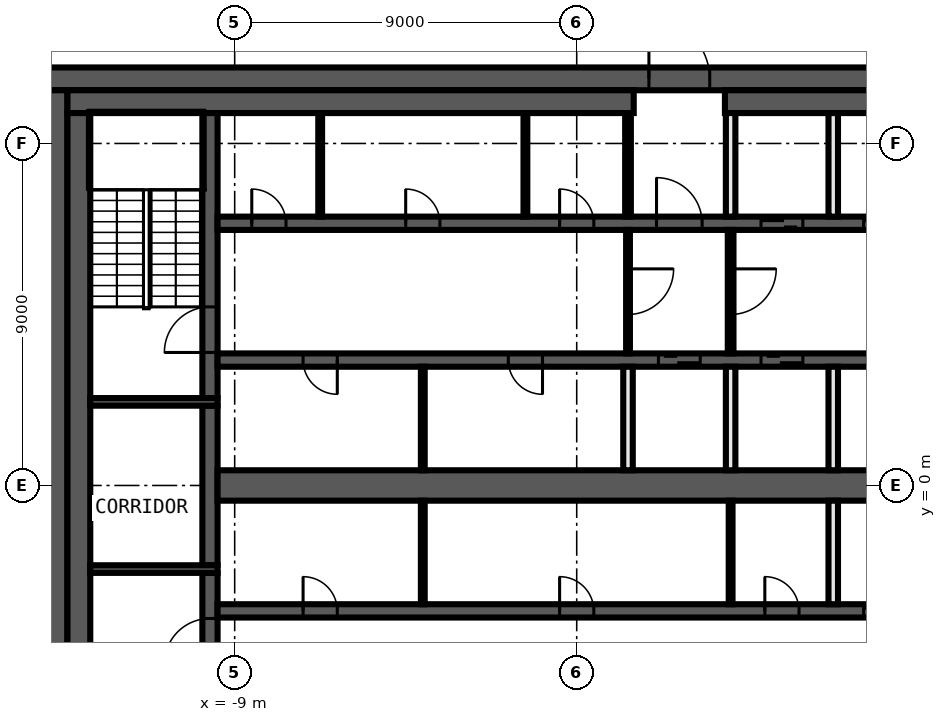
"""IFC4 building model, lengths in metres.
Left out: names, types, materials, properties, quantities, classifications, styles, units other than length and angle.
Written with IfcOpenShell. Run it as: python <this file> out.ifc"""

import sys

from ifc_helpers import new_model, si_unit, direction, frame, frame_2d, origin, place, context, subcontext, project, spatial, rectangle, extrude, element, fill, save


model = new_model("IFC4")
c1 = context("Model", 3, precision=1e-05, world=origin(), true_north=direction((0.0, 1.0)))
c2 = subcontext(c1, "Body", "Model", "MODEL_VIEW")
j1 = project(units=[si_unit("LENGTHUNIT", "METRE"), si_unit("PLANEANGLEUNIT", "RADIAN")], contexts=[c1])
p1 = place(None, origin())
s1 = spatial("IfcSite", under=j1, at=p1, CompositionType="ELEMENT")
p2 = place(p1, origin())
s2 = spatial("IfcBuilding", under=s1, at=p2, CompositionType="ELEMENT")
p3 = place(p2, frame((0.0, 0.0, 344.6)))
s3 = spatial("IfcBuildingStorey", under=s2, at=p3, CompositionType="ELEMENT", Elevation=344.6)
p4 = place(p3, frame((-14.0, 10.7, 0.0), z_axis=(0.0, 0.0, 1.0), x_axis=(1.0, 0.0, 0.0)))
e1 = element("IfcWall", 1, at=p4, inside=s3, PredefinedType="SHEAR", context=c2, shape_type="SweptSolid", body=[
    extrude(rectangle(XDim=28.0, YDim=0.6, at=frame_2d((14.0, 0.0))), origin(), (0.0, 0.0, 1.0), 3.82),
])
p5 = place(p4, frame((15.9, 0.0, 0.0)))
e2 = element("IfcOpeningElement", 2, at=p5, cuts=e1, PredefinedType="OPENING", context=c2, shape_type="SweptSolid", body=[
    extrude(rectangle(XDim=1.6, YDim=2.1, at=frame_2d((0.8, 1.05))), frame((0.0, 0.31, 0.0), z_axis=(0.0, -1.0, 0.0), x_axis=(1.0, 0.0, 0.0)), (0.0, 0.0, 1.0), 0.62),
])
p6 = place(p3, frame((-13.7, -10.4, 0.0), z_axis=(0.0, 0.0, 1.0), x_axis=(0.0, 1.0, 0.0)))
e3 = element("IfcWall", 3, at=p6, inside=s3, PredefinedType="SHEAR", context=c2, shape_type="SweptSolid", body=[
    extrude(rectangle(XDim=20.8, YDim=0.6, at=frame_2d((10.4, 0.0))), origin(), (0.0, 0.0, 1.0), 3.82),
])
p7 = place(p3, frame((-13.4, 10.1, 0.0), z_axis=(0.0, 0.0, 1.0), x_axis=(1.0, 0.0, 0.0)))
e4 = element("IfcWall", 4, at=p7, inside=s3, PredefinedType="SHEAR", context=c2, shape_type="SweptSolid", body=[
    extrude(rectangle(XDim=14.9, YDim=0.6, at=frame_2d((7.45, 0.0))), origin(), (0.0, 0.0, 1.0), 3.82),
])
p8 = place(p3, frame((3.9, 10.1, 0.0), z_axis=(0.0, 0.0, 1.0), x_axis=(1.0, 0.0, 0.0)))
e5 = element("IfcWall", 5, at=p8, inside=s3, PredefinedType="SHEAR", context=c2, shape_type="SweptSolid", body=[
    extrude(rectangle(XDim=9.5, YDim=0.6, at=frame_2d((4.75, 0.0))), origin(), (0.0, 0.0, 1.0), 3.82),
])
p9 = place(p3, frame((-13.1, -9.8, 0.0), z_axis=(0.0, 0.0, 1.0), x_axis=(0.0, 1.0, 0.0)))
e6 = element("IfcWall", 6, at=p9, inside=s3, PredefinedType="SHEAR", context=c2, shape_type="SweptSolid", body=[
    extrude(rectangle(XDim=19.6, YDim=0.6, at=frame_2d((9.8, 0.0))), origin(), (0.0, 0.0, 1.0), 3.82),
])
p10 = place(p3, frame((-9.65, -9.8, 0.0), z_axis=(0.0, 0.0, 1.0), x_axis=(0.0, 1.0, 0.0)))
e7 = element("IfcWall", 7, at=p10, inside=s3, PredefinedType="SHEAR", context=c2, shape_type="SweptSolid", body=[
    extrude(rectangle(XDim=7.5, YDim=0.4, at=frame_2d((3.75, 0.0))), origin(), (0.0, 0.0, 1.0), 3.82),
])
p11 = place(p10, frame((5.1, 0.0, 0.0)))
e8 = element("IfcOpeningElement", 8, at=p11, cuts=e7, PredefinedType="OPENING", context=c2, shape_type="SweptSolid", body=[
    extrude(rectangle(XDim=1.2, YDim=2.1, at=frame_2d((0.6, 1.05))), frame((0.0, 0.21, 0.0), z_axis=(0.0, -1.0, 0.0), x_axis=(1.0, 0.0, 0.0)), (0.0, 0.0, 1.0), 0.42),
])
p12 = place(p3, frame((-9.65, -2.1, 0.0), z_axis=(0.0, 0.0, 1.0), x_axis=(0.0, 1.0, 0.0)))
e9 = element("IfcWall", 9, at=p12, inside=s3, PredefinedType="SHEAR", context=c2, shape_type="SweptSolid", body=[
    extrude(rectangle(XDim=4.2, YDim=0.4, at=frame_2d((2.1, 0.0))), origin(), (0.0, 0.0, 1.0), 3.82),
])
p13 = place(p3, frame((-9.65, 2.3, 0.0), z_axis=(0.0, 0.0, 1.0), x_axis=(0.0, 1.0, 0.0)))
e10 = element("IfcWall", 10, at=p13, inside=s3, PredefinedType="SHEAR", context=c2, shape_type="SweptSolid", body=[
    extrude(rectangle(XDim=7.5, YDim=0.4, at=frame_2d((3.75, 0.0))), origin(), (0.0, 0.0, 1.0), 3.82),
])
p14 = place(p13, frame((1.2, 0.0, 0.0)))
e11 = element("IfcOpeningElement", 11, at=p14, cuts=e10, PredefinedType="OPENING", context=c2, shape_type="SweptSolid", body=[
    extrude(rectangle(XDim=1.2, YDim=2.1, at=frame_2d((0.6, 1.05))), frame((0.0, 0.21, 0.0), z_axis=(0.0, -1.0, 0.0), x_axis=(1.0, 0.0, 0.0)), (0.0, 0.0, 1.0), 0.42),
])
for number, where, z_axis, x_axis in (
    (12, (-9.45, 2.2, 0.0), (0.0, 0.0, 1.0), (-1.0, 0.0, 0.0)),
    (13, (-9.45, -2.2, 0.0), (0.0, 0.0, 1.0), (-1.0, 0.0, 0.0)),
):
    element("IfcWall", number, at=place(p3, frame(where, z_axis=z_axis, x_axis=x_axis)), inside=s3, PredefinedType="SHEAR", context=c2, shape_type="SweptSolid", body=[
        extrude(rectangle(XDim=3.35, YDim=0.2, at=frame_2d((1.675, 0.0))), origin(), (0.0, 0.0, 1.0), 3.82),
    ])
p15 = place(p3, frame((-9.45, 6.9, 0.0), z_axis=(0.0, 0.0, 1.0), x_axis=(1.0, 0.0, 0.0)))
e14 = element("IfcWall", 14, at=p15, inside=s3, PredefinedType="SHEAR", context=c2, shape_type="SweptSolid", body=[
    extrude(rectangle(XDim=18.9, YDim=0.35, at=frame_2d((9.45, 0.0))), origin(), (0.0, 0.0, 1.0), 3.82),
])
p16 = place(p15, frame((11.55, 0.0, 0.0)))
e15 = element("IfcOpeningElement", 15, at=p16, cuts=e14, PredefinedType="OPENING", context=c2, shape_type="SweptSolid", body=[
    extrude(rectangle(XDim=1.2, YDim=2.1, at=frame_2d((0.6, 1.05))), frame((0.0, 0.185, 0.0), z_axis=(0.0, -1.0, 0.0), x_axis=(1.0, 0.0, 0.0)), (0.0, 0.0, 1.0), 0.37),
])
p17 = place(p15, frame((14.3, 0.0, 0.0)))
e16 = element("IfcOpeningElement", 16, at=p17, cuts=e14, PredefinedType="OPENING", context=c2, shape_type="SweptSolid", body=[
    extrude(rectangle(XDim=1.1, YDim=2.1, at=frame_2d((0.55, 1.05))), frame((0.0, 0.185, 0.0), z_axis=(0.0, -1.0, 0.0), x_axis=(1.0, 0.0, 0.0)), (0.0, 0.0, 1.0), 0.37),
])
p18 = place(p15, frame((17.0, 0.0, 0.0)))
e17 = element("IfcOpeningElement", 17, at=p18, cuts=e14, PredefinedType="OPENING", context=c2, shape_type="SweptSolid", body=[
    extrude(rectangle(XDim=1.1, YDim=2.1, at=frame_2d((0.55, 1.05))), frame((0.0, 0.185, 0.0), z_axis=(0.0, -1.0, 0.0), x_axis=(1.0, 0.0, 0.0)), (0.0, 0.0, 1.0), 0.37),
])
p19 = place(p15, frame((0.9, 0.0, 0.0)))
e18 = element("IfcOpeningElement", 18, at=p19, cuts=e14, PredefinedType="OPENING", context=c2, shape_type="SweptSolid", body=[
    extrude(rectangle(XDim=0.9, YDim=2.1, at=frame_2d((0.45, 1.05))), frame((0.0, 0.185, 0.0), z_axis=(0.0, -1.0, 0.0), x_axis=(1.0, 0.0, 0.0)), (0.0, 0.0, 1.0), 0.37),
])
p20 = place(p15, frame((4.95, 0.0, 0.0)))
e19 = element("IfcOpeningElement", 19, at=p20, cuts=e14, PredefinedType="OPENING", context=c2, shape_type="SweptSolid", body=[
    extrude(rectangle(XDim=0.9, YDim=2.1, at=frame_2d((0.45, 1.05))), frame((0.0, 0.185, 0.0), z_axis=(0.0, -1.0, 0.0), x_axis=(1.0, 0.0, 0.0)), (0.0, 0.0, 1.0), 0.37),
])
p21 = place(p15, frame((9.0, 0.0, 0.0)))
e20 = element("IfcOpeningElement", 20, at=p21, cuts=e14, PredefinedType="OPENING", context=c2, shape_type="SweptSolid", body=[
    extrude(rectangle(XDim=0.9, YDim=2.1, at=frame_2d((0.45, 1.05))), frame((0.0, 0.185, 0.0), z_axis=(0.0, -1.0, 0.0), x_axis=(1.0, 0.0, 0.0)), (0.0, 0.0, 1.0), 0.37),
])
p22 = place(p3, frame((9.45, 3.3, 0.0), z_axis=(0.0, 0.0, 1.0), x_axis=(-1.0, 0.0, 0.0)))
e21 = element("IfcWall", 21, at=p22, inside=s3, PredefinedType="SHEAR", context=c2, shape_type="SweptSolid", body=[
    extrude(rectangle(XDim=18.9, YDim=0.35, at=frame_2d((9.45, 0.0))), origin(), (0.0, 0.0, 1.0), 3.82),
])
p23 = place(p22, frame((6.2, 0.0, 0.0)))
e22 = element("IfcOpeningElement", 22, at=p23, cuts=e21, PredefinedType="OPENING", context=c2, shape_type="SweptSolid", body=[
    extrude(rectangle(XDim=1.1, YDim=2.1, at=frame_2d((0.55, 1.05))), frame((0.0, 0.185, 0.0), z_axis=(0.0, -1.0, 0.0), x_axis=(1.0, 0.0, 0.0)), (0.0, 0.0, 1.0), 0.37),
])
p24 = place(p22, frame((3.5, 0.0, 0.0)))
e23 = element("IfcOpeningElement", 23, at=p24, cuts=e21, PredefinedType="OPENING", context=c2, shape_type="SweptSolid", body=[
    extrude(rectangle(XDim=1.1, YDim=2.1, at=frame_2d((0.55, 1.05))), frame((0.0, 0.185, 0.0), z_axis=(0.0, -1.0, 0.0), x_axis=(1.0, 0.0, 0.0)), (0.0, 0.0, 1.0), 0.37),
])
p25 = place(p22, frame((0.9, 0.0, 0.0)))
e24 = element("IfcOpeningElement", 24, at=p25, cuts=e21, PredefinedType="OPENING", context=c2, shape_type="SweptSolid", body=[
    extrude(rectangle(XDim=0.9, YDim=2.1, at=frame_2d((0.45, 1.05))), frame((0.0, 0.185, 0.0), z_axis=(0.0, -1.0, 0.0), x_axis=(1.0, 0.0, 0.0)), (0.0, 0.0, 1.0), 0.37),
])
p26 = place(p22, frame((15.75, 0.0, 0.0)))
e25 = element("IfcOpeningElement", 25, at=p26, cuts=e21, PredefinedType="OPENING", context=c2, shape_type="SweptSolid", body=[
    extrude(rectangle(XDim=0.9, YDim=2.1, at=frame_2d((0.45, 1.05))), frame((0.0, 0.185, 0.0), z_axis=(0.0, -1.0, 0.0), x_axis=(1.0, 0.0, 0.0)), (0.0, 0.0, 1.0), 0.37),
])
p27 = place(p22, frame((10.35, 0.0, 0.0)))
e26 = element("IfcOpeningElement", 26, at=p27, cuts=e21, PredefinedType="OPENING", context=c2, shape_type="SweptSolid", body=[
    extrude(rectangle(XDim=0.9, YDim=2.1, at=frame_2d((0.45, 1.05))), frame((0.0, 0.185, 0.0), z_axis=(0.0, -1.0, 0.0), x_axis=(1.0, 0.0, 0.0)), (0.0, 0.0, 1.0), 0.37),
])
p28 = place(p3, frame((-9.45, -3.3, 0.0), z_axis=(0.0, 0.0, 1.0), x_axis=(1.0, 0.0, 0.0)))
e27 = element("IfcWall", 27, at=p28, inside=s3, PredefinedType="SHEAR", context=c2, shape_type="SweptSolid", body=[
    extrude(rectangle(XDim=18.9, YDim=0.35, at=frame_2d((9.45, 0.0))), origin(), (0.0, 0.0, 1.0), 3.82),
])
p29 = place(p28, frame((17.0, 0.0, 0.0)))
e28 = element("IfcOpeningElement", 28, at=p29, cuts=e27, PredefinedType="OPENING", context=c2, shape_type="SweptSolid", body=[
    extrude(rectangle(XDim=1.1, YDim=2.1, at=frame_2d((0.55, 1.05))), frame((0.0, 0.185, 0.0), z_axis=(0.0, -1.0, 0.0), x_axis=(1.0, 0.0, 0.0)), (0.0, 0.0, 1.0), 0.37),
])
p30 = place(p28, frame((2.25, 0.0, 0.0)))
e29 = element("IfcOpeningElement", 29, at=p30, cuts=e27, PredefinedType="OPENING", context=c2, shape_type="SweptSolid", body=[
    extrude(rectangle(XDim=0.9, YDim=2.1, at=frame_2d((0.45, 1.05))), frame((0.0, 0.185, 0.0), z_axis=(0.0, -1.0, 0.0), x_axis=(1.0, 0.0, 0.0)), (0.0, 0.0, 1.0), 0.37),
])
p31 = place(p28, frame((9.0, 0.0, 0.0)))
e30 = element("IfcOpeningElement", 30, at=p31, cuts=e27, PredefinedType="OPENING", context=c2, shape_type="SweptSolid", body=[
    extrude(rectangle(XDim=0.9, YDim=2.1, at=frame_2d((0.45, 1.05))), frame((0.0, 0.185, 0.0), z_axis=(0.0, -1.0, 0.0), x_axis=(1.0, 0.0, 0.0)), (0.0, 0.0, 1.0), 0.37),
])
p32 = place(p28, frame((14.4, 0.0, 0.0)))
e31 = element("IfcOpeningElement", 31, at=p32, cuts=e27, PredefinedType="OPENING", context=c2, shape_type="SweptSolid", body=[
    extrude(rectangle(XDim=0.9, YDim=2.1, at=frame_2d((0.45, 1.05))), frame((0.0, 0.185, 0.0), z_axis=(0.0, -1.0, 0.0), x_axis=(1.0, 0.0, 0.0)), (0.0, 0.0, 1.0), 0.37),
])
p33 = place(p3, frame((-9.45, 0.0, 0.0), z_axis=(0.0, 0.0, 1.0), x_axis=(1.0, 0.0, 0.0)))
e32 = element("IfcWall", 32, at=p33, inside=s3, PredefinedType="SHEAR", context=c2, shape_type="SweptSolid", body=[
    extrude(rectangle(XDim=18.9, YDim=0.8, at=frame_2d((9.45, 0.0))), origin(), (0.0, 0.0, 1.0), 3.82),
])
for number, where, z_axis, x_axis in (
    (33, (6.75, -3.125, 0.0), (0.0, 0.0, 1.0), (0.0, 1.0, 0.0)),
    (34, (6.75, 0.4, 0.0), (0.0, 0.0, 1.0), (0.0, 1.0, 0.0)),
    (35, (6.75, 7.075, 0.0), (0.0, 0.0, 1.0), (0.0, 1.0, 0.0)),
):
    element("IfcWall", number, at=place(p3, frame(where, z_axis=z_axis, x_axis=x_axis)), inside=s3, PredefinedType="SOLIDWALL", context=c2, shape_type="SweptSolid", body=[
        extrude(rectangle(XDim=2.725, YDim=0.25, at=frame_2d((1.363, 0.0))), origin(), (0.0, 0.0, 1.0), 3.82),
    ])
p34 = place(p3, frame((4.05, 6.725, 0.0), z_axis=(0.0, 0.0, 1.0), x_axis=(0.0, -1.0, 0.0)))
e36 = element("IfcWall", 36, at=p34, inside=s3, PredefinedType="PARTITIONING", context=c2, shape_type="SweptSolid", body=[
    extrude(rectangle(XDim=3.25, YDim=0.15, at=frame_2d((1.625, 0.0))), origin(), (0.0, 0.0, 1.0), 3.82),
])
p35 = place(p34, frame((1.025, 0.0, 0.0)))
e37 = element("IfcOpeningElement", 37, at=p35, cuts=e36, PredefinedType="OPENING", context=c2, shape_type="SweptSolid", body=[
    extrude(rectangle(XDim=1.2, YDim=2.1, at=frame_2d((0.6, 1.05))), frame((0.0, 0.085, 0.0), z_axis=(0.0, -1.0, 0.0), x_axis=(1.0, 0.0, 0.0)), (0.0, 0.0, 1.0), 0.17),
])
p36 = place(p3, frame((4.05, -3.125, 0.0), z_axis=(0.0, 0.0, 1.0), x_axis=(0.0, 1.0, 0.0)))
e38 = element("IfcWall", 38, at=p36, inside=s3, PredefinedType="PARTITIONING", context=c2, shape_type="SweptSolid", body=[
    extrude(rectangle(XDim=2.725, YDim=0.1, at=frame_2d((1.363, 0.0))), origin(), (0.0, 0.0, 1.0), 3.82),
])
for number, where, z_axis, x_axis in (
    (39, (4.05, 0.4, 0.0), (0.0, 0.0, 1.0), (0.0, 1.0, 0.0)),
    (40, (4.05, 7.075, 0.0), (0.0, 0.0, 1.0), (0.0, 1.0, 0.0)),
):
    element("IfcWall", number, at=place(p3, frame(where, z_axis=z_axis, x_axis=x_axis)), inside=s3, PredefinedType="SOLIDWALL", context=c2, shape_type="SweptSolid", body=[
        extrude(rectangle(XDim=2.725, YDim=0.25, at=frame_2d((1.363, 0.0))), origin(), (0.0, 0.0, 1.0), 3.82),
    ])
p37 = place(p3, frame((1.35, 7.075, 0.0), z_axis=(0.0, 0.0, 1.0), x_axis=(0.0, 1.0, 0.0)))
e41 = element("IfcWall", 41, at=p37, inside=s3, PredefinedType="PARTITIONING", context=c2, shape_type="SweptSolid", body=[
    extrude(rectangle(XDim=2.725, YDim=0.15, at=frame_2d((1.363, 0.0))), origin(), (0.0, 0.0, 1.0), 3.82),
])
p38 = place(p3, frame((1.35, 6.725, 0.0), z_axis=(0.0, 0.0, 1.0), x_axis=(0.0, -1.0, 0.0)))
e42 = element("IfcWall", 42, at=p38, inside=s3, PredefinedType="PARTITIONING", context=c2, shape_type="SweptSolid", body=[
    extrude(rectangle(XDim=3.25, YDim=0.1, at=frame_2d((1.625, 0.0))), origin(), (0.0, 0.0, 1.0), 3.82),
])
p39 = place(p38, frame((1.025, 0.0, 0.0)))
e43 = element("IfcOpeningElement", 43, at=p39, cuts=e42, PredefinedType="OPENING", context=c2, shape_type="SweptSolid", body=[
    extrude(rectangle(XDim=1.2, YDim=2.1, at=frame_2d((0.6, 1.05))), frame((0.0, 0.06, 0.0), z_axis=(0.0, -1.0, 0.0), x_axis=(1.0, 0.0, 0.0)), (0.0, 0.0, 1.0), 0.12),
])
p40 = place(p3, frame((1.35, 0.4, 0.0), z_axis=(0.0, 0.0, 1.0), x_axis=(0.0, 1.0, 0.0)))
e44 = element("IfcWall", 44, at=p40, inside=s3, PredefinedType="SOLIDWALL", context=c2, shape_type="SweptSolid", body=[
    extrude(rectangle(XDim=2.725, YDim=0.25, at=frame_2d((1.363, 0.0))), origin(), (0.0, 0.0, 1.0), 3.82),
])
for number, where, z_axis, x_axis in (
    (45, (-1.35, 7.075, 0.0), (0.0, 0.0, 1.0), (0.0, 1.0, 0.0)),
    (46, (-4.05, -3.125, 0.0), (0.0, 0.0, 1.0), (0.0, 1.0, 0.0)),
    (47, (-4.05, 0.4, 0.0), (0.0, 0.0, 1.0), (0.0, 1.0, 0.0)),
    (48, (-6.75, 7.075, 0.0), (0.0, 0.0, 1.0), (0.0, 1.0, 0.0)),
):
    element("IfcWall", number, at=place(p3, frame(where, z_axis=z_axis, x_axis=x_axis)), inside=s3, PredefinedType="PARTITIONING", context=c2, shape_type="SweptSolid", body=[
        extrude(rectangle(XDim=2.725, YDim=0.1, at=frame_2d((1.363, 0.0))), origin(), (0.0, 0.0, 1.0), 3.82),
    ])
p41 = place(p5, origin())
e49 = element("IfcDoor", 49, at=p41, inside=s3, OperationType="DOUBLE_DOOR_SINGLE_SWING", PredefinedType="DOOR", context=c2, shape_type="SweptSolid", body=[
    extrude(rectangle(XDim=1.6, YDim=2.1, at=frame_2d((0.8, 1.05))), frame((0.0, 0.025, 0.0), z_axis=(0.0, -1.0, 0.0), x_axis=(1.0, 0.0, 0.0)), (0.0, 0.0, 1.0), 0.05),
])
fill(e2, e49)
p42 = place(p16, origin())
e50 = element("IfcDoor", 50, at=p42, inside=s3, OperationType="SINGLE_SWING_LEFT", PredefinedType="DOOR", context=c2, shape_type="SweptSolid", body=[
    extrude(rectangle(XDim=1.2, YDim=2.1, at=frame_2d((0.6, 1.05))), frame((0.0, 0.025, 0.0), z_axis=(0.0, -1.0, 0.0), x_axis=(1.0, 0.0, 0.0)), (0.0, 0.0, 1.0), 0.05),
])
fill(e15, e50)
p43 = place(p17, origin())
e51 = element("IfcDoor", 51, at=p43, inside=s3, OperationType="DOUBLE_DOOR_SLIDING", PredefinedType="DOOR", context=c2, shape_type="SweptSolid", body=[
    extrude(rectangle(XDim=1.1, YDim=2.1, at=frame_2d((0.55, 1.05))), frame((0.0, 0.025, 0.0), z_axis=(0.0, -1.0, 0.0), x_axis=(1.0, 0.0, 0.0)), (0.0, 0.0, 1.0), 0.05),
])
fill(e16, e51)
p44 = place(p18, origin())
e52 = element("IfcDoor", 52, at=p44, inside=s3, OperationType="DOUBLE_DOOR_SLIDING", PredefinedType="DOOR", context=c2, shape_type="SweptSolid", body=[
    extrude(rectangle(XDim=1.1, YDim=2.1, at=frame_2d((0.55, 1.05))), frame((0.0, 0.025, 0.0), z_axis=(0.0, -1.0, 0.0), x_axis=(1.0, 0.0, 0.0)), (0.0, 0.0, 1.0), 0.05),
])
fill(e17, e52)
p45 = place(p23, origin())
e53 = element("IfcDoor", 53, at=p45, inside=s3, OperationType="DOUBLE_DOOR_SLIDING", PredefinedType="DOOR", context=c2, shape_type="SweptSolid", body=[
    extrude(rectangle(XDim=1.1, YDim=2.1, at=frame_2d((0.55, 1.05))), frame((0.0, 0.025, 0.0), z_axis=(0.0, -1.0, 0.0), x_axis=(1.0, 0.0, 0.0)), (0.0, 0.0, 1.0), 0.05),
])
fill(e22, e53)
p46 = place(p24, origin())
e54 = element("IfcDoor", 54, at=p46, inside=s3, OperationType="DOUBLE_DOOR_SLIDING", PredefinedType="DOOR", context=c2, shape_type="SweptSolid", body=[
    extrude(rectangle(XDim=1.1, YDim=2.1, at=frame_2d((0.55, 1.05))), frame((0.0, 0.025, 0.0), z_axis=(0.0, -1.0, 0.0), x_axis=(1.0, 0.0, 0.0)), (0.0, 0.0, 1.0), 0.05),
])
fill(e23, e54)
p47 = place(p29, origin())
e55 = element("IfcDoor", 55, at=p47, inside=s3, OperationType="DOUBLE_DOOR_SLIDING", PredefinedType="DOOR", context=c2, shape_type="SweptSolid", body=[
    extrude(rectangle(XDim=1.1, YDim=2.1, at=frame_2d((0.55, 1.05))), frame((0.0, 0.025, 0.0), z_axis=(0.0, -1.0, 0.0), x_axis=(1.0, 0.0, 0.0)), (0.0, 0.0, 1.0), 0.05),
])
fill(e28, e55)
p48 = place(p19, origin())
e56 = element("IfcDoor", 56, at=p48, inside=s3, OperationType="SINGLE_SWING_RIGHT", PredefinedType="DOOR", context=c2, shape_type="SweptSolid", body=[
    extrude(rectangle(XDim=0.9, YDim=2.1, at=frame_2d((0.45, 1.05))), frame((0.0, 0.025, 0.0), z_axis=(0.0, -1.0, 0.0), x_axis=(1.0, 0.0, 0.0)), (0.0, 0.0, 1.0), 0.05),
])
fill(e18, e56)
p49 = place(p20, origin())
e57 = element("IfcDoor", 57, at=p49, inside=s3, OperationType="SINGLE_SWING_LEFT", PredefinedType="DOOR", context=c2, shape_type="SweptSolid", body=[
    extrude(rectangle(XDim=0.9, YDim=2.1, at=frame_2d((0.45, 1.05))), frame((0.0, 0.025, 0.0), z_axis=(0.0, -1.0, 0.0), x_axis=(1.0, 0.0, 0.0)), (0.0, 0.0, 1.0), 0.05),
])
fill(e19, e57)
p50 = place(p21, origin())
e58 = element("IfcDoor", 58, at=p50, inside=s3, OperationType="SINGLE_SWING_RIGHT", PredefinedType="DOOR", context=c2, shape_type="SweptSolid", body=[
    extrude(rectangle(XDim=0.9, YDim=2.1, at=frame_2d((0.45, 1.05))), frame((0.0, 0.025, 0.0), z_axis=(0.0, -1.0, 0.0), x_axis=(1.0, 0.0, 0.0)), (0.0, 0.0, 1.0), 0.05),
])
fill(e20, e58)
p51 = place(p26, origin())
e59 = element("IfcDoor", 59, at=p51, inside=s3, OperationType="SINGLE_SWING_LEFT", PredefinedType="DOOR", context=c2, shape_type="SweptSolid", body=[
    extrude(rectangle(XDim=0.9, YDim=2.1, at=frame_2d((0.45, 1.05))), frame((0.0, 0.025, 0.0), z_axis=(0.0, -1.0, 0.0), x_axis=(1.0, 0.0, 0.0)), (0.0, 0.0, 1.0), 0.05),
])
fill(e25, e59)
p52 = place(p27, origin())
e60 = element("IfcDoor", 60, at=p52, inside=s3, OperationType="SINGLE_SWING_RIGHT", PredefinedType="DOOR", context=c2, shape_type="SweptSolid", body=[
    extrude(rectangle(XDim=0.9, YDim=2.1, at=frame_2d((0.45, 1.05))), frame((0.0, 0.025, 0.0), z_axis=(0.0, -1.0, 0.0), x_axis=(1.0, 0.0, 0.0)), (0.0, 0.0, 1.0), 0.05),
])
fill(e26, e60)
p53 = place(p30, origin())
e61 = element("IfcDoor", 61, at=p53, inside=s3, OperationType="SINGLE_SWING_LEFT", PredefinedType="DOOR", context=c2, shape_type="SweptSolid", body=[
    extrude(rectangle(XDim=0.9, YDim=2.1, at=frame_2d((0.45, 1.05))), frame((0.0, 0.025, 0.0), z_axis=(0.0, -1.0, 0.0), x_axis=(1.0, 0.0, 0.0)), (0.0, 0.0, 1.0), 0.05),
])
fill(e29, e61)
p54 = place(p31, origin())
e62 = element("IfcDoor", 62, at=p54, inside=s3, OperationType="SINGLE_SWING_RIGHT", PredefinedType="DOOR", context=c2, shape_type="SweptSolid", body=[
    extrude(rectangle(XDim=0.9, YDim=2.1, at=frame_2d((0.45, 1.05))), frame((0.0, 0.025, 0.0), z_axis=(0.0, -1.0, 0.0), x_axis=(1.0, 0.0, 0.0)), (0.0, 0.0, 1.0), 0.05),
])
fill(e30, e62)
p55 = place(p32, origin())
e63 = element("IfcDoor", 63, at=p55, inside=s3, OperationType="SINGLE_SWING_LEFT", PredefinedType="DOOR", context=c2, shape_type="SweptSolid", body=[
    extrude(rectangle(XDim=0.9, YDim=2.1, at=frame_2d((0.45, 1.05))), frame((0.0, 0.025, 0.0), z_axis=(0.0, -1.0, 0.0), x_axis=(1.0, 0.0, 0.0)), (0.0, 0.0, 1.0), 0.05),
])
fill(e31, e63)
p56 = place(p14, origin())
e64 = element("IfcDoor", 64, at=p56, inside=s3, OperationType="SINGLE_SWING_RIGHT", PredefinedType="DOOR", context=c2, shape_type="SweptSolid", body=[
    extrude(rectangle(XDim=1.2, YDim=2.1, at=frame_2d((0.6, 1.05))), frame((0.0, 0.025, 0.0), z_axis=(0.0, -1.0, 0.0), x_axis=(1.0, 0.0, 0.0)), (0.0, 0.0, 1.0), 0.05),
])
fill(e11, e64)
p57 = place(p11, origin())
e65 = element("IfcDoor", 65, at=p57, inside=s3, OperationType="SINGLE_SWING_LEFT", PredefinedType="DOOR", context=c2, shape_type="SweptSolid", body=[
    extrude(rectangle(XDim=1.2, YDim=2.1, at=frame_2d((0.6, 1.05))), frame((0.0, 0.025, 0.0), z_axis=(0.0, -1.0, 0.0), x_axis=(1.0, 0.0, 0.0)), (0.0, 0.0, 1.0), 0.05),
])
fill(e8, e65)
p58 = place(p39, origin())
e66 = element("IfcDoor", 66, at=p58, inside=s3, OperationType="SINGLE_SWING_LEFT", PredefinedType="DOOR", context=c2, shape_type="SweptSolid", body=[
    extrude(rectangle(XDim=1.2, YDim=2.1, at=frame_2d((0.6, 1.05))), frame((0.0, 0.025, 0.0), z_axis=(0.0, -1.0, 0.0), x_axis=(1.0, 0.0, 0.0)), (0.0, 0.0, 1.0), 0.05),
])
fill(e43, e66)
p59 = place(p35, origin())
e67 = element("IfcDoor", 67, at=p59, inside=s3, OperationType="SINGLE_SWING_RIGHT", PredefinedType="DOOR", context=c2, shape_type="SweptSolid", body=[
    extrude(rectangle(XDim=1.2, YDim=2.1, at=frame_2d((0.6, 1.05))), frame((0.0, 0.025, 0.0), z_axis=(0.0, -1.0, 0.0), x_axis=(1.0, 0.0, 0.0)), (0.0, 0.0, 1.0), 0.05),
])
fill(e37, e67)
save(model, sys.argv[1])
